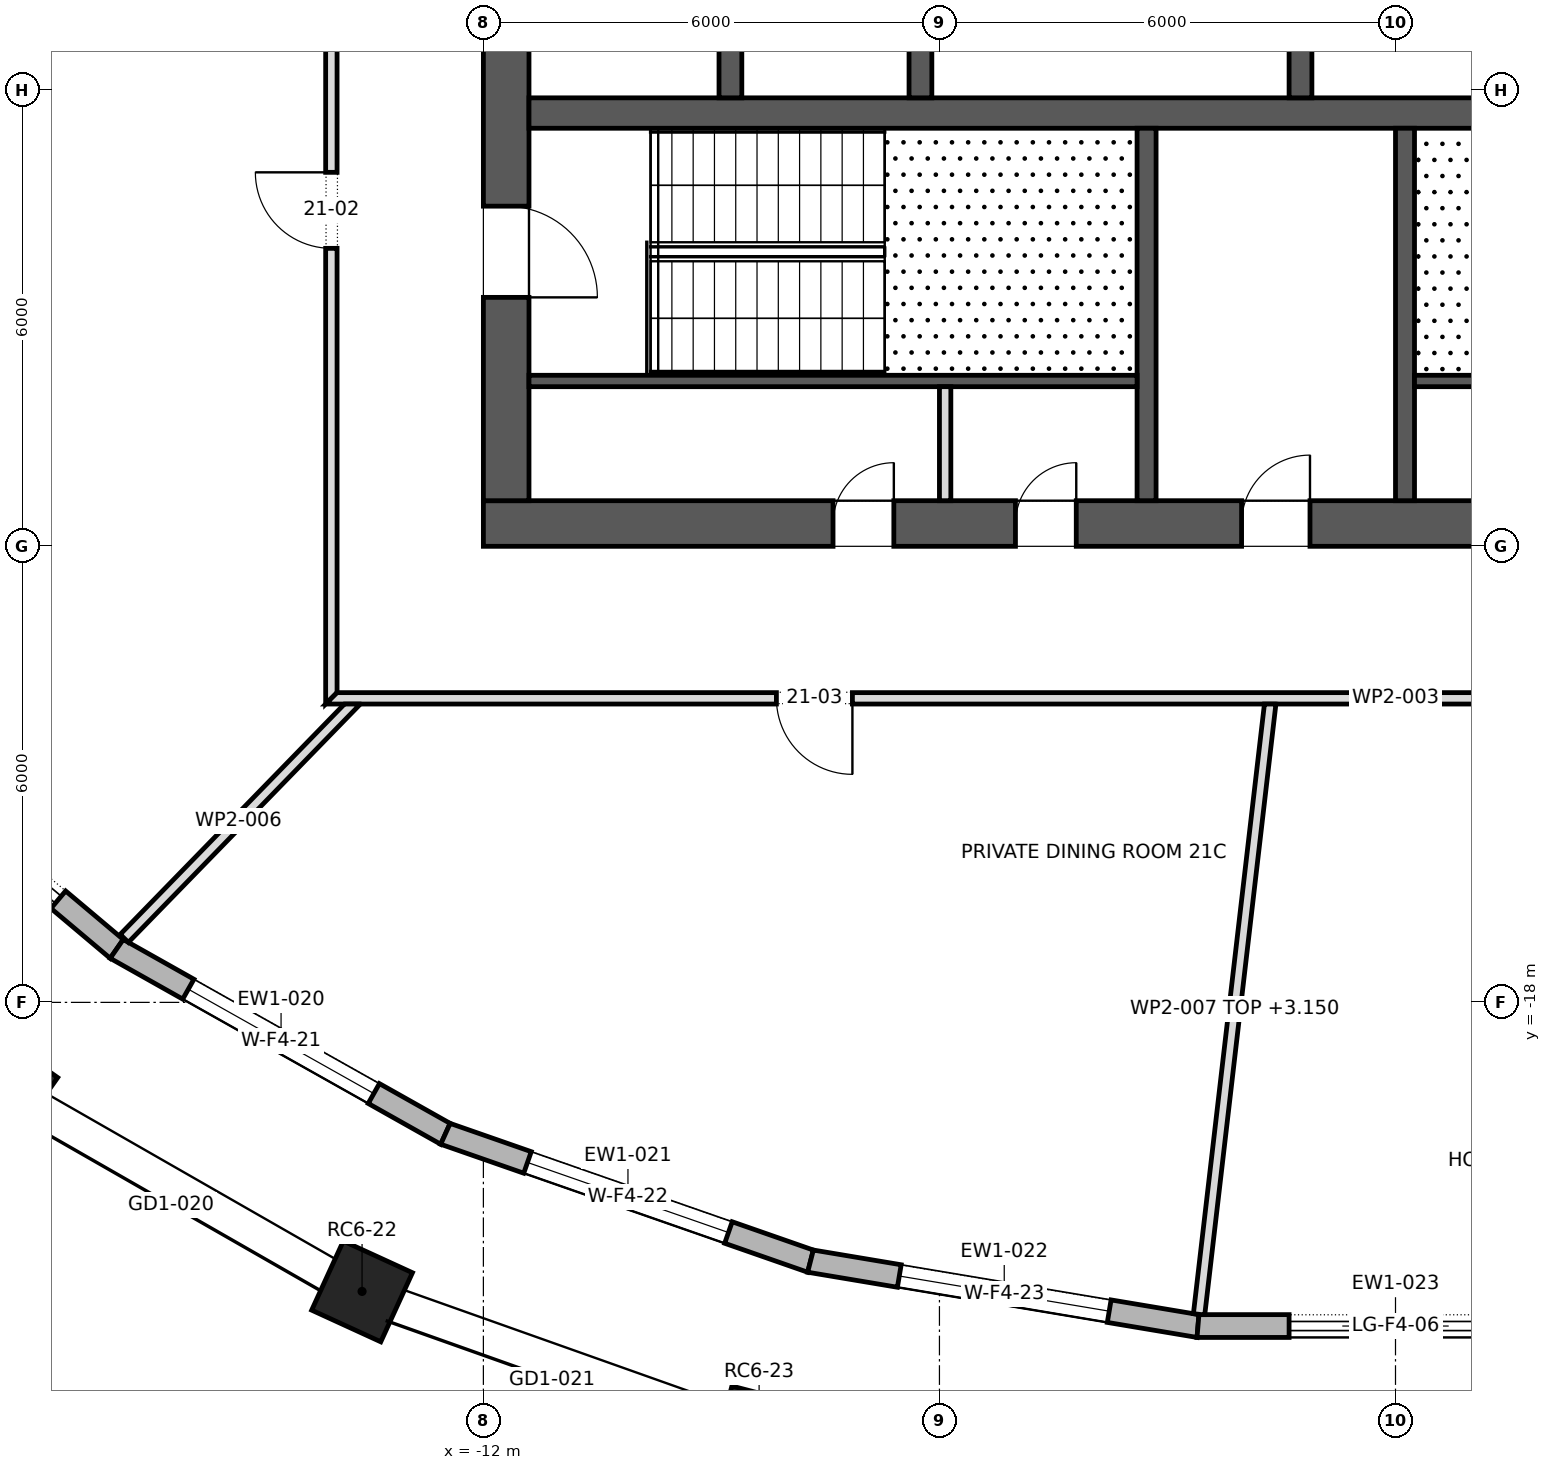
"""IFC4 building model, lengths in metres.
Left out: names, types, materials, properties, quantities, classifications, styles, units other than length and angle.
Written with IfcOpenShell. Run it as: python <this file> out.ifc"""

import sys

from ifc_helpers import new_model, si_unit, direction, frame, frame_2d, origin, origin_2d, place, context, subcontext, project, spatial, polyline, rectangle, outline, extrude, element, fill, save


model = new_model("IFC4")
c1 = context("Model", 3, precision=1e-05, world=origin(), true_north=direction((0.0, 1.0)))
c2 = subcontext(c1, "Body", "Model", "MODEL_VIEW")
j1 = project(units=[si_unit("LENGTHUNIT", "METRE"), si_unit("PLANEANGLEUNIT", "RADIAN")], contexts=[c1])
p1 = place(None, origin())
s1 = spatial("IfcSite", under=j1, at=p1, CompositionType="ELEMENT")
p2 = place(p1, origin())
s2 = spatial("IfcBuilding", under=s1, at=p2, CompositionType="ELEMENT")
p3 = place(p2, frame((0.0, 0.0, 300.3)))
s3 = spatial("IfcBuildingStorey", under=s2, at=p3, CompositionType="ELEMENT", Elevation=300.3)
for number, where, z_axis, x_axis in (
    (1, (-18.297, -19.11, 0.0), (0.0, 0.0, 1.0), (0.818, -0.575, 0.0)),
    (2, (-13.596, -21.803, 0.0), (0.0, 0.0, 1.0), (0.909, -0.417, 0.0)),
    (3, (-8.372, -23.657, 0.0), (0.0, 0.0, 1.0), (0.968, -0.252, 0.0)),
):
    element("IfcColumn", number, at=place(p3, frame(where, z_axis=z_axis, x_axis=x_axis)), inside=s3, PredefinedType="COLUMN", context=c2, shape_type="SweptSolid", body=[
        extrude(rectangle(XDim=1.0, YDim=1.0, at=origin_2d()), origin(), (0.0, 0.0, 1.0), 4.0),
    ])
p4 = place(p3, frame((-12.0, -11.7, 0.0), z_axis=(0.0, 0.0, 1.0), x_axis=(1.0, 0.0, 0.0)))
e4 = element("IfcWall", 4, at=p4, inside=s3, PredefinedType="SHEAR", context=c2, shape_type="SweptSolid", body=[
    extrude(rectangle(XDim=24.0, YDim=0.6, at=frame_2d((12.0, 0.0))), origin(), (0.0, 0.0, 1.0), 4.0),
])
p5 = place(p4, frame((9.975, 0.0, 0.0)))
e5 = element("IfcOpeningElement", 5, at=p5, cuts=e4, PredefinedType="OPENING", context=c2, shape_type="SweptSolid", body=[
    extrude(rectangle(XDim=0.9, YDim=2.1, at=frame_2d((0.45, 1.05))), frame((0.0, 0.312, 0.0), z_axis=(0.0, -1.0, 0.0), x_axis=(1.0, 0.0, 0.0)), (0.0, 0.0, 1.0), 0.624),
])
p6 = place(p4, frame((4.6, 0.0, 0.0)))
e6 = element("IfcOpeningElement", 6, at=p6, cuts=e4, PredefinedType="OPENING", context=c2, shape_type="SweptSolid", body=[
    extrude(rectangle(XDim=0.8, YDim=2.1, at=frame_2d((0.4, 1.05))), frame((0.0, 0.312, 0.0), z_axis=(0.0, -1.0, 0.0), x_axis=(1.0, 0.0, 0.0)), (0.0, 0.0, 1.0), 0.624),
])
p7 = place(p4, frame((7.0, 0.0, 0.0)))
e7 = element("IfcOpeningElement", 7, at=p7, cuts=e4, PredefinedType="OPENING", context=c2, shape_type="SweptSolid", body=[
    extrude(rectangle(XDim=0.8, YDim=2.1, at=frame_2d((0.4, 1.05))), frame((0.0, 0.312, 0.0), z_axis=(0.0, -1.0, 0.0), x_axis=(1.0, 0.0, 0.0)), (0.0, 0.0, 1.0), 0.624),
])
p8 = place(p4, frame((15.85, 0.0, 0.0)))
e8 = element("IfcOpeningElement", 8, at=p8, cuts=e4, PredefinedType="OPENING", context=c2, shape_type="SweptSolid", body=[
    extrude(rectangle(XDim=0.8, YDim=2.1, at=frame_2d((0.4, 1.05))), frame((0.0, 0.312, 0.0), z_axis=(0.0, -1.0, 0.0), x_axis=(1.0, 0.0, 0.0)), (0.0, 0.0, 1.0), 0.624),
])
p9 = place(p3, frame((-11.7, -11.4, 0.0), z_axis=(0.0, 0.0, 1.0), x_axis=(0.0, 1.0, 0.0)))
e9 = element("IfcWall", 9, at=p9, inside=s3, PredefinedType="SHEAR", context=c2, shape_type="SweptSolid", body=[
    extrude(rectangle(XDim=22.8, YDim=0.6, at=frame_2d((11.4, 0.0))), origin(), (0.0, 0.0, 1.0), 4.0),
])
p10 = place(p9, frame((10.2, 0.0, 0.0)))
e10 = element("IfcOpeningElement", 10, at=p10, cuts=e9, PredefinedType="OPENING", context=c2, shape_type="SweptSolid", body=[
    extrude(rectangle(XDim=2.4, YDim=2.1, at=frame_2d((1.2, 1.05))), frame((0.0, 0.312, 0.0), z_axis=(0.0, -1.0, 0.0), x_axis=(1.0, 0.0, 0.0)), (0.0, 0.0, 1.0), 0.624),
])
p11 = place(p9, frame((18.925, 0.0, 0.0)))
e11 = element("IfcOpeningElement", 11, at=p11, cuts=e9, PredefinedType="OPENING", context=c2, shape_type="SweptSolid", body=[
    extrude(rectangle(XDim=1.2, YDim=2.1, at=frame_2d((0.6, 1.05))), frame((0.0, 0.312, 0.0), z_axis=(0.0, -1.0, 0.0), x_axis=(1.0, 0.0, 0.0)), (0.0, 0.0, 1.0), 0.624),
])
p12 = place(p9, frame((2.675, 0.0, 0.0)))
e12 = element("IfcOpeningElement", 12, at=p12, cuts=e9, PredefinedType="OPENING", context=c2, shape_type="SweptSolid", body=[
    extrude(rectangle(XDim=1.2, YDim=2.1, at=frame_2d((0.6, 1.05))), frame((0.0, 0.312, 0.0), z_axis=(0.0, -1.0, 0.0), x_axis=(1.0, 0.0, 0.0)), (0.0, 0.0, 1.0), 0.624),
])
p13 = place(p3, frame((-11.4, -6.3, 0.0), z_axis=(0.0, 0.0, 1.0), x_axis=(1.0, 0.0, 0.0)))
e13 = element("IfcWall", 13, at=p13, inside=s3, PredefinedType="SHEAR", context=c2, shape_type="SweptSolid", body=[
    extrude(rectangle(XDim=22.8, YDim=0.4, at=frame_2d((11.4, 0.0))), origin(), (0.0, 0.0, 1.0), 4.0),
])
p14 = place(p13, frame((20.85, 0.0, 0.0)))
e14 = element("IfcOpeningElement", 14, at=p14, cuts=e13, PredefinedType="OPENING", context=c2, shape_type="SweptSolid", body=[
    extrude(rectangle(XDim=1.1, YDim=2.1, at=frame_2d((0.55, 1.05))), frame((0.0, 0.212, 0.0), z_axis=(0.0, -1.0, 0.0), x_axis=(1.0, 0.0, 0.0)), (0.0, 0.0, 1.0), 0.424),
])
for number, where, z_axis, x_axis in (
    (15, (-8.75, -6.1, 0.0), (0.0, 0.0, 1.0), (0.0, 1.0, 0.0)),
    (16, (-6.25, -6.1, 0.0), (0.0, 0.0, 1.0), (0.0, 1.0, 0.0)),
    (17, (-1.25, -6.1, 0.0), (0.0, 0.0, 1.0), (0.0, 1.0, 0.0)),
):
    element("IfcWall", number, at=place(p3, frame(where, z_axis=z_axis, x_axis=x_axis)), inside=s3, PredefinedType="SHEAR", context=c2, shape_type="SweptSolid", body=[
        extrude(rectangle(XDim=2.9, YDim=0.3, at=frame_2d((1.45, 0.0))), origin(), (0.0, 0.0, 1.0), 4.0),
    ])
p15 = place(p3, frame((-20.503, -14.198, 0.0), z_axis=(0.0, 0.0, 1.0), x_axis=(0.764966473721, -0.644070100286, 0.0)))
e18 = element("IfcWall", 18, at=p15, inside=s3, PredefinedType="STANDARD", context=c2, shape_type="SweptSolid", body=[
    extrude(outline(polyline([(-0.015, -0.15), (4.824, -0.15), (4.796, 0.15), (0.015, 0.15), (-0.015, -0.15)])), origin(), (0.0, 0.0, 1.0), 3.7),
])
p16 = place(p15, frame((1.005, 0.0, 0.0)))
e19 = element("IfcOpeningElement", 19, at=p16, cuts=e18, PredefinedType="OPENING", context=c2, shape_type="SweptSolid", body=[
    extrude(rectangle(XDim=2.8, YDim=3.25, at=frame_2d((1.4, 1.625))), frame((0.0, 0.162, 0.0), z_axis=(0.0, -1.0, 0.0), x_axis=(1.0, 0.0, 0.0)), (0.0, 0.0, 1.0), 0.324),
])
p17 = place(p3, frame((-16.824, -17.296, 0.0), z_axis=(0.0, 0.0, 1.0), x_axis=(0.871512454536, -0.490373369575, 0.0)))
e20 = element("IfcWall", 20, at=p17, inside=s3, PredefinedType="STANDARD", context=c2, shape_type="SweptSolid", body=[
    extrude(outline(polyline([(-0.014, -0.15), (4.975, -0.15), (4.948, 0.15), (0.014, 0.15), (-0.014, -0.15)])), origin(), (0.0, 0.0, 1.0), 3.7),
])
p18 = place(p17, frame((1.081, 0.0, 0.6)))
e21 = element("IfcOpeningElement", 21, at=p18, cuts=e20, PredefinedType="OPENING", context=c2, shape_type="SweptSolid", body=[
    extrude(rectangle(XDim=2.8, YDim=2.65, at=frame_2d((1.4, 1.325))), frame((0.0, 0.162, 0.0), z_axis=(0.0, -1.0, 0.0), x_axis=(1.0, 0.0, 0.0)), (0.0, 0.0, 1.0), 0.324),
])
p19 = place(p3, frame((-12.5, -19.729, 0.0), z_axis=(0.0, 0.0, 1.0), x_axis=(0.944230376095, -0.329285585564, 0.0)))
e22 = element("IfcWall", 22, at=p19, inside=s3, PredefinedType="STANDARD", context=c2, shape_type="SweptSolid", body=[
    extrude(outline(polyline([(-0.013, -0.15), (5.1, -0.15), (5.074, 0.15), (0.013, 0.15), (-0.013, -0.15)])), origin(), (0.0, 0.0, 1.0), 3.7),
])
p20 = place(p19, frame((1.143, 0.0, 0.6)))
e23 = element("IfcOpeningElement", 23, at=p20, cuts=e22, PredefinedType="OPENING", context=c2, shape_type="SweptSolid", body=[
    extrude(rectangle(XDim=2.8, YDim=2.65, at=frame_2d((1.4, 1.325))), frame((0.0, 0.162, 0.0), z_axis=(0.0, -1.0, 0.0), x_axis=(1.0, 0.0, 0.0)), (0.0, 0.0, 1.0), 0.324),
])
p21 = place(p3, frame((-7.696, -21.404, 0.0), z_axis=(0.0, 0.0, 1.0), x_axis=(0.986263399459, -0.165180225475, 0.0)))
e24 = element("IfcWall", 24, at=p21, inside=s3, PredefinedType="STANDARD", context=c2, shape_type="SweptSolid", body=[
    extrude(outline(polyline([(-0.013, -0.15), (5.181, -0.15), (5.156, 0.15), (0.013, 0.15), (-0.013, -0.15)])), origin(), (0.0, 0.0, 1.0), 3.7),
])
p22 = place(p21, frame((1.184, 0.0, 0.6)))
e25 = element("IfcOpeningElement", 25, at=p22, cuts=e24, PredefinedType="OPENING", context=c2, shape_type="SweptSolid", body=[
    extrude(rectangle(XDim=2.8, YDim=2.65, at=frame_2d((1.4, 1.325))), frame((0.0, 0.162, 0.0), z_axis=(0.0, -1.0, 0.0), x_axis=(1.0, 0.0, 0.0)), (0.0, 0.0, 1.0), 0.324),
])
p23 = place(p3, frame((-2.599, -22.258, 0.0), z_axis=(0.0, 0.0, 1.0), x_axis=(1.0, 0.0, 0.0)))
e26 = element("IfcWall", 26, at=p23, inside=s3, PredefinedType="STANDARD", context=c2, shape_type="SweptSolid", body=[
    extrude(outline(polyline([(-0.012, -0.15), (5.21, -0.15), (5.185, 0.15), (0.012, 0.15), (-0.012, -0.15)])), origin(), (0.0, 0.0, 1.0), 3.7),
])
p24 = place(p23, frame((1.198, 0.0, 0.0)))
e27 = element("IfcOpeningElement", 27, at=p24, cuts=e26, PredefinedType="OPENING", context=c2, shape_type="SweptSolid", body=[
    extrude(rectangle(XDim=2.8, YDim=3.25, at=frame_2d((1.4, 1.625))), frame((0.0, 0.162, 0.0), z_axis=(0.0, -1.0, 0.0), x_axis=(1.0, 0.0, 0.0)), (0.0, 0.0, 1.0), 0.324),
])
for number, where, z_axis, x_axis in (
    (28, (-3.275, -11.4, 0.0), (0.0, 0.0, 1.0), (0.0, 1.0, 0.0)),
    (29, (0.125, -11.4, 0.0), (0.0, 0.0, 1.0), (0.0, 1.0, 0.0)),
):
    element("IfcWall", number, at=place(p3, frame(where, z_axis=z_axis, x_axis=x_axis)), inside=s3, PredefinedType="SHEAR", context=c2, shape_type="SweptSolid", body=[
        extrude(rectangle(XDim=4.9, YDim=0.25, at=frame_2d((2.45, 0.0))), origin(), (0.0, 0.0, 1.0), 3.7),
    ])
for number, where, z_axis, x_axis in (
    (30, (-11.4, -9.825, 0.0), (0.0, 0.0, 1.0), (1.0, 0.0, 0.0)),
    (31, (0.25, -9.825, 0.0), (0.0, 0.0, 1.0), (1.0, 0.0, 0.0)),
):
    element("IfcWall", number, at=place(p3, frame(where, z_axis=z_axis, x_axis=x_axis)), inside=s3, PredefinedType="SHEAR", context=c2, shape_type="SweptSolid", body=[
        extrude(rectangle(XDim=8.0, YDim=0.15, at=frame_2d((4.0, 0.0))), origin(), (0.0, 0.0, 1.0), 3.7),
    ])
p25 = place(p3, frame((-5.925, -11.4, 0.0), z_axis=(0.0, 0.0, 1.0), x_axis=(0.0, 1.0, 0.0)))
e32 = element("IfcWall", 32, at=p25, inside=s3, PredefinedType="PARTITIONING", context=c2, shape_type="SweptSolid", body=[
    extrude(rectangle(XDim=1.5, YDim=0.15, at=frame_2d((0.75, 0.0))), origin(), (0.0, 0.0, 1.0), 3.7),
])
p26 = place(p3, frame((-14.0, -14.075, 0.0), z_axis=(0.0, 0.0, 1.0), x_axis=(0.0, 1.0, 0.0)))
e33 = element("IfcWall", 33, at=p26, inside=s3, PredefinedType="PARTITIONING", context=c2, shape_type="SweptSolid", body=[
    extrude(outline(polyline([(0.15, -0.075), (2.139, -0.075), (4.128, -0.075), (6.118, -0.075), (8.107, -0.075), (10.096, -0.075), (12.086, -0.075), (14.075, -0.075), (16.064, -0.075), (18.053, -0.075), (20.043, -0.075), (22.032, -0.075), (24.021, -0.075), (26.011, -0.075), (28.0, -0.075), (28.15, 0.075), (26.273, 0.075), (24.396, 0.075), (22.52, 0.075), (20.643, 0.075), (18.767, 0.075), (16.89, 0.075), (15.013, 0.075), (13.137, 0.075), (11.26, 0.075), (9.383, 0.075), (7.507, 0.075), (5.63, 0.075), (3.753, 0.075), (1.877, 0.075), (0.0, 0.075), (0.15, -0.075)])), origin(), (0.0, 0.0, 1.0), 3.7),
])
p27 = place(p26, frame((17.43, 0.0, 0.0)))
e34 = element("IfcOpeningElement", 34, at=p27, cuts=e33, PredefinedType="OPENING", context=c2, shape_type="SweptSolid", body=[
    extrude(rectangle(XDim=1.8, YDim=2.1, at=frame_2d((0.9, 1.05))), frame((0.0, 0.087, 0.0), z_axis=(0.0, -1.0, 0.0), x_axis=(1.0, 0.0, 0.0)), (0.0, 0.0, 1.0), 0.174),
])
p28 = place(p26, frame((5.995, 0.0, 0.0)))
e35 = element("IfcOpeningElement", 35, at=p28, cuts=e33, PredefinedType="OPENING", context=c2, shape_type="SweptSolid", body=[
    extrude(rectangle(XDim=1.0, YDim=2.1, at=frame_2d((0.5, 1.05))), frame((0.0, 0.087, 0.0), z_axis=(0.0, -1.0, 0.0), x_axis=(1.0, 0.0, 0.0)), (0.0, 0.0, 1.0), 0.174),
])
p29 = place(p3, frame((-14.075, -14.0, 0.0), z_axis=(0.0, 0.0, 1.0), x_axis=(1.0, 0.0, 0.0)))
e36 = element("IfcWall", 36, at=p29, inside=s3, PredefinedType="PARTITIONING", context=c2, shape_type="SweptSolid", body=[
    extrude(outline(polyline([(0.0, -0.075), (1.877, -0.075), (3.753, -0.075), (5.63, -0.075), (7.507, -0.075), (9.383, -0.075), (11.26, -0.075), (13.137, -0.075), (15.013, -0.075), (16.89, -0.075), (18.767, -0.075), (20.643, -0.075), (22.52, -0.075), (24.396, -0.075), (26.273, -0.075), (28.15, -0.075), (28.0, 0.075), (26.011, 0.075), (24.021, 0.075), (22.032, 0.075), (20.043, 0.075), (18.053, 0.075), (16.064, 0.075), (14.075, 0.075), (12.086, 0.075), (10.096, 0.075), (8.107, 0.075), (6.118, 0.075), (4.128, 0.075), (2.139, 0.075), (0.15, 0.075), (0.0, -0.075)])), origin(), (0.0, 0.0, 1.0), 3.7),
])
p30 = place(p29, frame((5.93, 0.0, 0.0)))
e37 = element("IfcOpeningElement", 37, at=p30, cuts=e36, PredefinedType="OPENING", context=c2, shape_type="SweptSolid", body=[
    extrude(rectangle(XDim=1.0, YDim=2.1, at=frame_2d((0.5, 1.05))), frame((0.0, 0.087, 0.0), z_axis=(0.0, -1.0, 0.0), x_axis=(1.0, 0.0, 0.0)), (0.0, 0.0, 1.0), 0.174),
])
p31 = place(p29, frame((17.2, 0.0, 0.0)))
e38 = element("IfcOpeningElement", 38, at=p31, cuts=e36, PredefinedType="OPENING", context=c2, shape_type="SweptSolid", body=[
    extrude(rectangle(XDim=1.0, YDim=2.1, at=frame_2d((0.5, 1.05))), frame((0.0, 0.087, 0.0), z_axis=(0.0, -1.0, 0.0), x_axis=(1.0, 0.0, 0.0)), (0.0, 0.0, 1.0), 0.174),
])
p32 = place(p3, frame((-13.672, -14.023, 0.0), z_axis=(0.0, 0.0, 1.0), x_axis=(-0.697528481307, -0.716557058277, 0.0)))
e39 = element("IfcWall", 39, at=p32, inside=s3, PredefinedType="PARTITIONING", context=c2, shape_type="SweptSolid", body=[
    extrude(outline(polyline([(0.0, 0.075), (0.0, 0.075), (0.146, -0.075), (1.555, -0.075), (2.965, -0.075), (4.375, -0.075), (4.375, 0.075), (2.917, 0.075), (1.458, 0.075), (0.0, 0.075)])), origin(), (0.0, 0.0, 1.0), 3.7),
])
p33 = place(p3, frame((-1.648, -14.066, 0.0), z_axis=(0.0, 0.0, 1.0), x_axis=(-0.115734847025, -0.993280144362, 0.0)))
e40 = element("IfcWall", 40, at=p33, inside=s3, PredefinedType="PARTITIONING", context=c2, shape_type="SweptSolid", body=[
    extrude(outline(polyline([(8.092, -0.075), (8.092, 0.034), (8.087, 0.075), (6.47, 0.075), (4.852, 0.075), (3.235, 0.075), (1.617, 0.075), (0.0, 0.075), (0.0, 0.074), (0.017, -0.075), (1.632, -0.075), (3.247, -0.075), (4.862, -0.075), (6.477, -0.075), (8.092, -0.075)])), origin(), (0.0, 0.0, 1.0), 3.15),
])
p34 = place(p16, origin())
e41 = element("IfcDoor", 41, at=p34, inside=s3, OperationType="DOUBLE_DOOR_SLIDING", PredefinedType="DOOR", context=c2, shape_type="SweptSolid", body=[
    extrude(rectangle(XDim=2.8, YDim=3.25, at=frame_2d((1.4, 1.625))), frame((0.0, 0.025, 0.0), z_axis=(0.0, -1.0, 0.0), x_axis=(1.0, 0.0, 0.0)), (0.0, 0.0, 1.0), 0.05),
])
fill(e19, e41)
p35 = place(p18, origin())
e42 = element("IfcWindow", 42, at=p35, inside=s3, PartitioningType="DOUBLE_PANEL_VERTICAL", PredefinedType="WINDOW", context=c2, shape_type="SweptSolid", body=[
    extrude(rectangle(XDim=2.8, YDim=2.65, at=frame_2d((1.4, 1.325))), frame((0.0, 0.03, 0.0), z_axis=(0.0, -1.0, 0.0), x_axis=(1.0, 0.0, 0.0)), (0.0, 0.0, 1.0), 0.06),
])
fill(e21, e42)
p36 = place(p20, origin())
e43 = element("IfcWindow", 43, at=p36, inside=s3, PartitioningType="DOUBLE_PANEL_VERTICAL", PredefinedType="WINDOW", context=c2, shape_type="SweptSolid", body=[
    extrude(rectangle(XDim=2.8, YDim=2.65, at=frame_2d((1.4, 1.325))), frame((0.0, 0.03, 0.0), z_axis=(0.0, -1.0, 0.0), x_axis=(1.0, 0.0, 0.0)), (0.0, 0.0, 1.0), 0.06),
])
fill(e23, e43)
p37 = place(p22, origin())
e44 = element("IfcWindow", 44, at=p37, inside=s3, PartitioningType="DOUBLE_PANEL_VERTICAL", PredefinedType="WINDOW", context=c2, shape_type="SweptSolid", body=[
    extrude(rectangle(XDim=2.8, YDim=2.65, at=frame_2d((1.4, 1.325))), frame((0.0, 0.03, 0.0), z_axis=(0.0, -1.0, 0.0), x_axis=(1.0, 0.0, 0.0)), (0.0, 0.0, 1.0), 0.06),
])
fill(e25, e44)
p38 = place(p24, origin())
e45 = element("IfcDoor", 45, at=p38, inside=s3, OperationType="DOUBLE_DOOR_SLIDING", PredefinedType="DOOR", context=c2, shape_type="SweptSolid", body=[
    extrude(rectangle(XDim=2.8, YDim=3.25, at=frame_2d((1.4, 1.625))), frame((0.0, 0.025, 0.0), z_axis=(0.0, -1.0, 0.0), x_axis=(1.0, 0.0, 0.0)), (0.0, 0.0, 1.0), 0.05),
])
fill(e27, e45)
p39 = place(p12, frame((1.2, 0.0, 0.0), z_axis=(0.0, 0.0, 1.0), x_axis=(-1.0, 0.0, 0.0)))
e46 = element("IfcDoor", 46, at=p39, inside=s3, OperationType="SINGLE_SWING_LEFT", PredefinedType="DOOR", context=c2, shape_type="SweptSolid", body=[
    extrude(rectangle(XDim=1.2, YDim=2.1, at=frame_2d((0.6, 1.05))), frame((0.0, 0.025, 0.0), z_axis=(0.0, -1.0, 0.0), x_axis=(1.0, 0.0, 0.0)), (0.0, 0.0, 1.0), 0.05),
])
fill(e12, e46)
p40 = place(p5, origin())
e47 = element("IfcDoor", 47, at=p40, inside=s3, OperationType="SINGLE_SWING_LEFT", PredefinedType="DOOR", context=c2, shape_type="SweptSolid", body=[
    extrude(rectangle(XDim=0.9, YDim=2.1, at=frame_2d((0.45, 1.05))), frame((0.0, 0.025, 0.0), z_axis=(0.0, -1.0, 0.0), x_axis=(1.0, 0.0, 0.0)), (0.0, 0.0, 1.0), 0.05),
])
fill(e5, e47)
p41 = place(p6, origin())
e48 = element("IfcDoor", 48, at=p41, inside=s3, OperationType="SINGLE_SWING_LEFT", PredefinedType="DOOR", context=c2, shape_type="SweptSolid", body=[
    extrude(rectangle(XDim=0.8, YDim=2.1, at=frame_2d((0.4, 1.05))), frame((0.0, 0.025, 0.0), z_axis=(0.0, -1.0, 0.0), x_axis=(1.0, 0.0, 0.0)), (0.0, 0.0, 1.0), 0.05),
])
fill(e6, e48)
p42 = place(p7, origin())
e49 = element("IfcDoor", 49, at=p42, inside=s3, OperationType="SINGLE_SWING_LEFT", PredefinedType="DOOR", context=c2, shape_type="SweptSolid", body=[
    extrude(rectangle(XDim=0.8, YDim=2.1, at=frame_2d((0.4, 1.05))), frame((0.0, 0.025, 0.0), z_axis=(0.0, -1.0, 0.0), x_axis=(1.0, 0.0, 0.0)), (0.0, 0.0, 1.0), 0.05),
])
fill(e7, e49)
p43 = place(p28, origin())
e50 = element("IfcDoor", 50, at=p43, inside=s3, OperationType="SINGLE_SWING_LEFT", PredefinedType="DOOR", context=c2, shape_type="SweptSolid", body=[
    extrude(rectangle(XDim=1.0, YDim=2.1, at=frame_2d((0.5, 1.05))), frame((0.0, 0.025, 0.0), z_axis=(0.0, -1.0, 0.0), x_axis=(1.0, 0.0, 0.0)), (0.0, 0.0, 1.0), 0.05),
])
fill(e35, e50)
p44 = place(p30, frame((1.0, 0.0, 0.0), z_axis=(0.0, 0.0, 1.0), x_axis=(-1.0, 0.0, 0.0)))
e51 = element("IfcDoor", 51, at=p44, inside=s3, OperationType="SINGLE_SWING_RIGHT", PredefinedType="DOOR", context=c2, shape_type="SweptSolid", body=[
    extrude(rectangle(XDim=1.0, YDim=2.1, at=frame_2d((0.5, 1.05))), frame((0.0, 0.025, 0.0), z_axis=(0.0, -1.0, 0.0), x_axis=(1.0, 0.0, 0.0)), (0.0, 0.0, 1.0), 0.05),
])
fill(e37, e51)
save(model, sys.argv[1])
